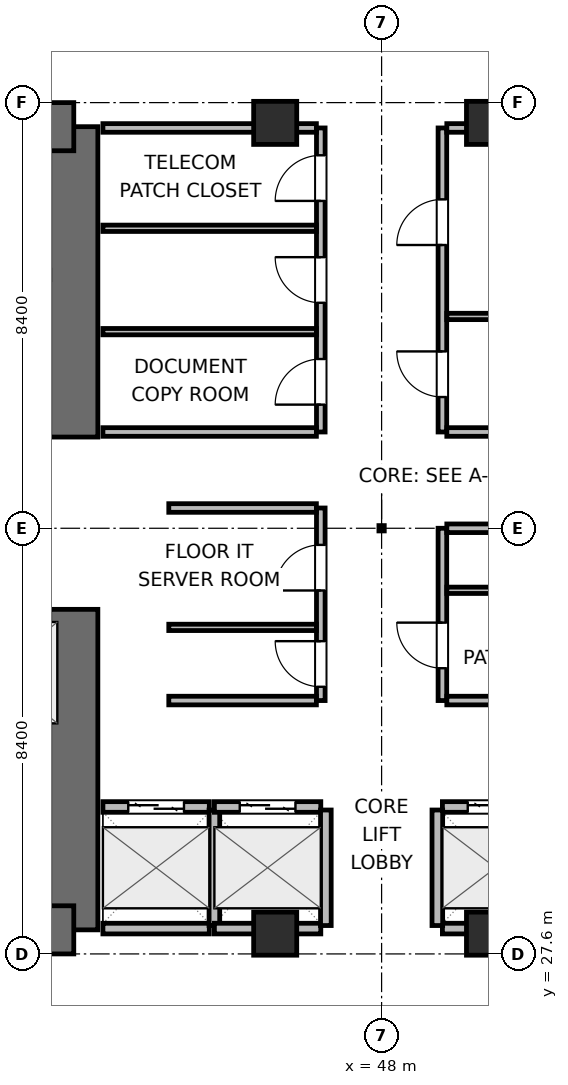
"""IFC4 building model, lengths in metres.
Left out: names, types, materials, properties, quantities, classifications, styles, units other than length and angle.
Written with IfcOpenShell. Run it as: python <this file> out.ifc"""

import sys

from ifc_helpers import new_model, si_unit, direction, frame, frame_2d, origin, origin_2d, place, context, subcontext, project, spatial, rectangle, extrude, element, fill, save


model = new_model("IFC4")
c1 = context("Model", 3, precision=1e-05, world=origin(), true_north=direction((0.0, 1.0)))
c2 = subcontext(c1, "Body", "Model", "MODEL_VIEW")
j1 = project(units=[si_unit("LENGTHUNIT", "METRE"), si_unit("PLANEANGLEUNIT", "RADIAN")], contexts=[c1])
p1 = place(None, origin())
s1 = spatial("IfcSite", under=j1, at=p1, CompositionType="ELEMENT")
p2 = place(p1, origin())
s2 = spatial("IfcBuilding", under=s1, at=p2, CompositionType="ELEMENT")
p3 = place(p2, frame((0.0, 0.0, 37.2)))
s3 = spatial("IfcBuildingStorey", under=s2, at=p3, CompositionType="ELEMENT", Elevation=37.2)
p4 = place(p3, frame((41.925, 28.075, 0.0), z_axis=(0.0, 0.0, 1.0), x_axis=(0.0, 1.0, 0.0)))
e1 = element("IfcWall", 1, at=p4, inside=s3, PredefinedType="SHEAR", context=c2, shape_type="SweptSolid", body=[
    extrude(rectangle(XDim=6.325, YDim=0.95, at=frame_2d((3.163, 0.0))), origin(), (0.0, 0.0, 1.0), 3.9),
])
p5 = place(p3, frame((41.925, 37.8, 0.0), z_axis=(0.0, 0.0, 1.0), x_axis=(0.0, 1.0, 0.0)))
e2 = element("IfcWall", 2, at=p5, inside=s3, PredefinedType="SHEAR", context=c2, shape_type="SweptSolid", body=[
    extrude(rectangle(XDim=6.125, YDim=0.95, at=frame_2d((3.062, 0.0))), origin(), (0.0, 0.0, 1.0), 3.9),
])
p6 = place(p3, frame((32.875, 28.075, 0.0), z_axis=(0.0, 0.0, 1.0), x_axis=(1.0, 0.0, 0.0)))
e3 = element("IfcWall", 3, at=p6, inside=s3, PredefinedType="SHEAR", context=c2, shape_type="SweptSolid", body=[
    extrude(rectangle(XDim=9.05, YDim=0.95, at=frame_2d((4.525, 0.0))), origin(), (0.0, 0.0, 1.0), 3.9),
])
p7 = place(p6, frame((4.975, 0.0, 0.0)))
e4 = element("IfcOpeningElement", 4, at=p7, cuts=e3, PredefinedType="OPENING", context=c2, shape_type="SweptSolid", body=[
    extrude(rectangle(XDim=1.05, YDim=2.04, at=frame_2d((0.525, 1.02))), frame((0.0, 0.485, 0.0), z_axis=(0.0, -1.0, 0.0), x_axis=(1.0, 0.0, 0.0)), (0.0, 0.0, 1.0), 0.97),
])
p8 = place(p3, frame((32.875, 43.925, 0.0), z_axis=(0.0, 0.0, 1.0), x_axis=(1.0, 0.0, 0.0)))
e5 = element("IfcWall", 5, at=p8, inside=s3, PredefinedType="SHEAR", context=c2, shape_type="SweptSolid", body=[
    extrude(rectangle(XDim=9.05, YDim=0.95, at=frame_2d((4.525, 0.0))), origin(), (0.0, 0.0, 1.0), 3.9),
])
p9 = place(p8, frame((0.975, 0.0, 0.0)))
e6 = element("IfcOpeningElement", 6, at=p9, cuts=e5, PredefinedType="OPENING", context=c2, shape_type="SweptSolid", body=[
    extrude(rectangle(XDim=0.95, YDim=2.04, at=frame_2d((0.475, 1.02))), frame((0.0, 0.485, 0.0), z_axis=(0.0, -1.0, 0.0), x_axis=(1.0, 0.0, 0.0)), (0.0, 0.0, 1.0), 0.97),
])
p10 = place(p8, frame((4.225, 0.0, 0.0)))
e7 = element("IfcOpeningElement", 7, at=p10, cuts=e5, PredefinedType="OPENING", context=c2, shape_type="SweptSolid", body=[
    extrude(rectangle(XDim=0.9, YDim=2.02, at=frame_2d((0.45, 1.01))), frame((0.0, 0.485, 0.0), z_axis=(0.0, -1.0, 0.0), x_axis=(1.0, 0.0, 0.0)), (0.0, 0.0, 1.0), 0.97),
])
p11 = place(p8, frame((7.125, 0.0, 0.0)))
e8 = element("IfcOpeningElement", 8, at=p11, cuts=e5, PredefinedType="OPENING", context=c2, shape_type="SweptSolid", body=[
    extrude(rectangle(XDim=0.9, YDim=2.02, at=frame_2d((0.45, 1.01))), frame((0.0, 0.485, 0.0), z_axis=(0.0, -1.0, 0.0), x_axis=(1.0, 0.0, 0.0)), (0.0, 0.0, 1.0), 0.97),
])
for number, where, z_axis, x_axis in (
    (9, (45.9, 28.0, 0.0), (0.0, 0.0, 1.0), (1.0, 0.0, 0.0)),
    (10, (50.1, 28.0, 0.0), (0.0, 0.0, 1.0), (1.0, 0.0, 0.0)),
    (11, (45.9, 44.0, 0.0), (0.0, 0.0, 1.0), (1.0, 0.0, 0.0)),
    (12, (50.1, 44.0, 0.0), (0.0, 0.0, 1.0), (1.0, 0.0, 0.0)),
):
    element("IfcColumn", number, at=place(p3, frame(where, z_axis=z_axis, x_axis=x_axis)), inside=s3, PredefinedType="COLUMN", context=c2, shape_type="SweptSolid", body=[
        extrude(rectangle(XDim=0.85, YDim=0.85, at=origin_2d()), origin(), (0.0, 0.0, 1.0), 3.9),
    ])
p12 = place(p3, frame((42.5, 30.5, 0.0), z_axis=(0.0, 0.0, 1.0), x_axis=(1.0, 0.0, 0.0)))
e13 = element("IfcWall", 13, at=p12, inside=s3, PredefinedType="PARTITIONING", context=c2, shape_type="SweptSolid", body=[
    extrude(rectangle(XDim=2.1, YDim=0.21, at=frame_2d((1.05, 0.0))), origin(), (0.0, 0.0, 1.0), 3.64),
])
p13 = place(p12, frame((0.5, 0.0, 0.0)))
e14 = element("IfcOpeningElement", 14, at=p13, cuts=e13, PredefinedType="OPENING", context=c2, shape_type="SweptSolid", body=[
    extrude(rectangle(XDim=1.1, YDim=2.04, at=frame_2d((0.55, 1.02))), frame((0.0, 0.115, 0.0), z_axis=(0.0, -1.0, 0.0), x_axis=(1.0, 0.0, 0.0)), (0.0, 0.0, 1.0), 0.23),
])
p14 = place(p3, frame((42.5, 28.1, 0.0), z_axis=(0.0, 0.0, 1.0), x_axis=(1.0, 0.0, 0.0)))
e15 = element("IfcWall", 15, at=p14, inside=s3, PredefinedType="PARTITIONING", context=c2, shape_type="SweptSolid", body=[
    extrude(rectangle(XDim=2.1, YDim=0.21, at=frame_2d((1.05, 0.0))), origin(), (0.0, 0.0, 1.0), 2.525),
])
p15 = place(p3, frame((44.7, 28.16, 0.0), z_axis=(0.0, 0.0, 1.0), x_axis=(0.0, 1.0, 0.0)))
e16 = element("IfcWall", 16, at=p15, inside=s3, PredefinedType="PARTITIONING", context=c2, shape_type="SweptSolid", body=[
    extrude(rectangle(XDim=2.28, YDim=0.21, at=frame_2d((1.14, 0.0))), origin(), (0.0, 0.0, 1.0), 3.64),
])
p16 = place(p3, frame((44.7, 30.5, 0.0), z_axis=(0.0, 0.0, 1.0), x_axis=(1.0, 0.0, 0.0)))
e17 = element("IfcWall", 17, at=p16, inside=s3, PredefinedType="PARTITIONING", context=c2, shape_type="SweptSolid", body=[
    extrude(rectangle(XDim=2.1, YDim=0.21, at=frame_2d((1.05, 0.0))), origin(), (0.0, 0.0, 1.0), 3.64),
])
p17 = place(p16, frame((0.5, 0.0, 0.0)))
e18 = element("IfcOpeningElement", 18, at=p17, cuts=e17, PredefinedType="OPENING", context=c2, shape_type="SweptSolid", body=[
    extrude(rectangle(XDim=1.1, YDim=2.04, at=frame_2d((0.55, 1.02))), frame((0.0, 0.115, 0.0), z_axis=(0.0, -1.0, 0.0), x_axis=(1.0, 0.0, 0.0)), (0.0, 0.0, 1.0), 0.23),
])
p18 = place(p3, frame((44.7, 28.1, 0.0), z_axis=(0.0, 0.0, 1.0), x_axis=(1.0, 0.0, 0.0)))
e19 = element("IfcWall", 19, at=p18, inside=s3, PredefinedType="PARTITIONING", context=c2, shape_type="SweptSolid", body=[
    extrude(rectangle(XDim=2.1, YDim=0.21, at=frame_2d((1.05, 0.0))), origin(), (0.0, 0.0, 1.0), 2.525),
])
p19 = place(p3, frame((46.9, 28.16, 0.0), z_axis=(0.0, 0.0, 1.0), x_axis=(0.0, 1.0, 0.0)))
e20 = element("IfcWall", 20, at=p19, inside=s3, PredefinedType="PARTITIONING", context=c2, shape_type="SweptSolid", body=[
    extrude(rectangle(XDim=2.28, YDim=0.21, at=frame_2d((1.14, 0.0))), origin(), (0.0, 0.0, 1.0), 3.64),
])
p20 = place(p3, frame((49.2, 30.5, 0.0), z_axis=(0.0, 0.0, 1.0), x_axis=(1.0, 0.0, 0.0)))
e21 = element("IfcWall", 21, at=p20, inside=s3, PredefinedType="PARTITIONING", context=c2, shape_type="SweptSolid", body=[
    extrude(rectangle(XDim=2.1, YDim=0.21, at=frame_2d((1.05, 0.0))), origin(), (0.0, 0.0, 1.0), 3.64),
])
p21 = place(p20, frame((0.5, 0.0, 0.0)))
e22 = element("IfcOpeningElement", 22, at=p21, cuts=e21, PredefinedType="OPENING", context=c2, shape_type="SweptSolid", body=[
    extrude(rectangle(XDim=1.1, YDim=2.04, at=frame_2d((0.55, 1.02))), frame((0.0, 0.115, 0.0), z_axis=(0.0, -1.0, 0.0), x_axis=(1.0, 0.0, 0.0)), (0.0, 0.0, 1.0), 0.23),
])
p22 = place(p3, frame((49.2, 28.1, 0.0), z_axis=(0.0, 0.0, 1.0), x_axis=(1.0, 0.0, 0.0)))
e23 = element("IfcWall", 23, at=p22, inside=s3, PredefinedType="PARTITIONING", context=c2, shape_type="SweptSolid", body=[
    extrude(rectangle(XDim=2.1, YDim=0.21, at=frame_2d((1.05, 0.0))), origin(), (0.0, 0.0, 1.0), 2.525),
])
p23 = place(p3, frame((49.1, 28.16, 0.0), z_axis=(0.0, 0.0, 1.0), x_axis=(0.0, 1.0, 0.0)))
e24 = element("IfcWall", 24, at=p23, inside=s3, PredefinedType="PARTITIONING", context=c2, shape_type="SweptSolid", body=[
    extrude(rectangle(XDim=2.28, YDim=0.21, at=frame_2d((1.14, 0.0))), origin(), (0.0, 0.0, 1.0), 3.64),
])
p24 = place(p3, frame((46.8, 32.6, 0.0), z_axis=(0.0, 0.0, 1.0), x_axis=(0.0, 1.0, 0.0)))
e25 = element("IfcWall", 25, at=p24, inside=s3, PredefinedType="PARTITIONING", context=c2, shape_type="SweptSolid", body=[
    extrude(rectangle(XDim=3.8, YDim=0.17, at=frame_2d((1.9, 0.0))), origin(), (0.0, 0.0, 1.0), 3.64),
])
p25 = place(p24, frame((0.272, 0.0, 0.0)))
e26 = element("IfcOpeningElement", 26, at=p25, cuts=e25, PredefinedType="OPENING", context=c2, shape_type="SweptSolid", body=[
    extrude(rectangle(XDim=0.9, YDim=2.02, at=frame_2d((0.45, 1.01))), frame((0.0, 0.095, 0.0), z_axis=(0.0, -1.0, 0.0), x_axis=(1.0, 0.0, 0.0)), (0.0, 0.0, 1.0), 0.19),
])
p26 = place(p24, frame((2.172, 0.0, 0.0)))
e27 = element("IfcOpeningElement", 27, at=p26, cuts=e25, PredefinedType="OPENING", context=c2, shape_type="SweptSolid", body=[
    extrude(rectangle(XDim=0.9, YDim=2.02, at=frame_2d((0.45, 1.01))), frame((0.0, 0.095, 0.0), z_axis=(0.0, -1.0, 0.0), x_axis=(1.0, 0.0, 0.0)), (0.0, 0.0, 1.0), 0.19),
])
for number, where, z_axis, x_axis in (
    (28, (43.8, 32.6, 0.0), (0.0, 0.0, 1.0), (1.0, 0.0, 0.0)),
    (29, (43.8, 36.4, 0.0), (0.0, 0.0, 1.0), (1.0, 0.0, 0.0)),
):
    element("IfcWall", number, at=place(p3, frame(where, z_axis=z_axis, x_axis=x_axis)), inside=s3, PredefinedType="PARTITIONING", context=c2, shape_type="SweptSolid", body=[
        extrude(rectangle(XDim=2.913, YDim=0.17, at=frame_2d((1.457, 0.0))), origin(), (0.0, 0.0, 1.0), 3.64),
    ])
p27 = place(p3, frame((43.8, 34.044, 0.0), z_axis=(0.0, 0.0, 1.0), x_axis=(1.0, 0.0, 0.0)))
e30 = element("IfcWall", 30, at=p27, inside=s3, PredefinedType="PARTITIONING", context=c2, shape_type="SweptSolid", body=[
    extrude(rectangle(XDim=2.913, YDim=0.125, at=frame_2d((1.457, 0.0))), origin(), (0.0, 0.0, 1.0), 3.64),
])
p28 = place(p3, frame((49.2, 32.6, 0.0), z_axis=(0.0, 0.0, 1.0), x_axis=(0.0, 1.0, 0.0)))
e31 = element("IfcWall", 31, at=p28, inside=s3, PredefinedType="PARTITIONING", context=c2, shape_type="SweptSolid", body=[
    extrude(rectangle(XDim=3.4, YDim=0.17, at=frame_2d((1.7, 0.0))), origin(), (0.0, 0.0, 1.0), 3.64),
])
p29 = place(p28, frame((0.638, 0.0, 0.0)))
e32 = element("IfcOpeningElement", 32, at=p29, cuts=e31, PredefinedType="OPENING", context=c2, shape_type="SweptSolid", body=[
    extrude(rectangle(XDim=0.9, YDim=2.02, at=frame_2d((0.45, 1.01))), frame((0.0, 0.095, 0.0), z_axis=(0.0, -1.0, 0.0), x_axis=(1.0, 0.0, 0.0)), (0.0, 0.0, 1.0), 0.19),
])
for number, where, z_axis, x_axis in (
    (33, (49.287, 32.6, 0.0), (0.0, 0.0, 1.0), (1.0, 0.0, 0.0)),
    (34, (49.287, 36.0, 0.0), (0.0, 0.0, 1.0), (1.0, 0.0, 0.0)),
):
    element("IfcWall", number, at=place(p3, frame(where, z_axis=z_axis, x_axis=x_axis)), inside=s3, PredefinedType="PARTITIONING", context=c2, shape_type="SweptSolid", body=[
        extrude(rectangle(XDim=2.913, YDim=0.17, at=frame_2d((1.457, 0.0))), origin(), (0.0, 0.0, 1.0), 3.64),
    ])
p30 = place(p3, frame((49.287, 34.776, 0.0), z_axis=(0.0, 0.0, 1.0), x_axis=(1.0, 0.0, 0.0)))
e35 = element("IfcWall", 35, at=p30, inside=s3, PredefinedType="PARTITIONING", context=c2, shape_type="SweptSolid", body=[
    extrude(rectangle(XDim=2.913, YDim=0.125, at=frame_2d((1.457, 0.0))), origin(), (0.0, 0.0, 1.0), 3.64),
])
p31 = place(p3, frame((46.8, 37.9, 0.0), z_axis=(0.0, 0.0, 1.0), x_axis=(0.0, 1.0, 0.0)))
e36 = element("IfcWall", 36, at=p31, inside=s3, PredefinedType="PARTITIONING", context=c2, shape_type="SweptSolid", body=[
    extrude(rectangle(XDim=6.0, YDim=0.17, at=frame_2d((3.0, 0.0))), origin(), (0.0, 0.0, 1.0), 3.64),
])
p32 = place(p31, frame((0.54, 0.0, 0.0)))
e37 = element("IfcOpeningElement", 37, at=p32, cuts=e36, PredefinedType="OPENING", context=c2, shape_type="SweptSolid", body=[
    extrude(rectangle(XDim=0.9, YDim=2.02, at=frame_2d((0.45, 1.01))), frame((0.0, 0.095, 0.0), z_axis=(0.0, -1.0, 0.0), x_axis=(1.0, 0.0, 0.0)), (0.0, 0.0, 1.0), 0.19),
])
p33 = place(p31, frame((2.55, 0.0, 0.0)))
e38 = element("IfcOpeningElement", 38, at=p33, cuts=e36, PredefinedType="OPENING", context=c2, shape_type="SweptSolid", body=[
    extrude(rectangle(XDim=0.9, YDim=2.02, at=frame_2d((0.45, 1.01))), frame((0.0, 0.095, 0.0), z_axis=(0.0, -1.0, 0.0), x_axis=(1.0, 0.0, 0.0)), (0.0, 0.0, 1.0), 0.19),
])
p34 = place(p31, frame((4.56, 0.0, 0.0)))
e39 = element("IfcOpeningElement", 39, at=p34, cuts=e36, PredefinedType="OPENING", context=c2, shape_type="SweptSolid", body=[
    extrude(rectangle(XDim=0.9, YDim=2.02, at=frame_2d((0.45, 1.01))), frame((0.0, 0.095, 0.0), z_axis=(0.0, -1.0, 0.0), x_axis=(1.0, 0.0, 0.0)), (0.0, 0.0, 1.0), 0.19),
])
p35 = place(p3, frame((42.5, 37.9, 0.0), z_axis=(0.0, 0.0, 1.0), x_axis=(1.0, 0.0, 0.0)))
e40 = element("IfcWall", 40, at=p35, inside=s3, PredefinedType="PARTITIONING", context=c2, shape_type="SweptSolid", body=[
    extrude(rectangle(XDim=4.213, YDim=0.17, at=frame_2d((2.106, 0.0))), origin(), (0.0, 0.0, 1.0), 3.64),
])
p36 = place(p3, frame((42.5, 43.9, 0.0), z_axis=(0.0, 0.0, 1.0), x_axis=(1.0, 0.0, 0.0)))
e41 = element("IfcWall", 41, at=p36, inside=s3, PredefinedType="PARTITIONING", context=c2, shape_type="SweptSolid", body=[
    extrude(rectangle(XDim=4.213, YDim=0.17, at=frame_2d((2.106, 0.0))), origin(), (0.0, 0.0, 1.0), 2.525),
])
for number, where, z_axis, x_axis in (
    (42, (42.5, 39.88, 0.0), (0.0, 0.0, 1.0), (1.0, 0.0, 0.0)),
    (43, (42.5, 41.92, 0.0), (0.0, 0.0, 1.0), (1.0, 0.0, 0.0)),
):
    element("IfcWall", number, at=place(p3, frame(where, z_axis=z_axis, x_axis=x_axis)), inside=s3, PredefinedType="PARTITIONING", context=c2, shape_type="SweptSolid", body=[
        extrude(rectangle(XDim=4.213, YDim=0.125, at=frame_2d((2.106, 0.0))), origin(), (0.0, 0.0, 1.0), 3.64),
    ])
p37 = place(p3, frame((49.2, 37.9, 0.0), z_axis=(0.0, 0.0, 1.0), x_axis=(0.0, 1.0, 0.0)))
e44 = element("IfcWall", 44, at=p37, inside=s3, PredefinedType="PARTITIONING", context=c2, shape_type="SweptSolid", body=[
    extrude(rectangle(XDim=6.0, YDim=0.17, at=frame_2d((3.0, 0.0))), origin(), (0.0, 0.0, 1.0), 3.64),
])
p38 = place(p37, frame((0.69, 0.0, 0.0)))
e45 = element("IfcOpeningElement", 45, at=p38, cuts=e44, PredefinedType="OPENING", context=c2, shape_type="SweptSolid", body=[
    extrude(rectangle(XDim=0.9, YDim=2.02, at=frame_2d((0.45, 1.01))), frame((0.0, 0.095, 0.0), z_axis=(0.0, -1.0, 0.0), x_axis=(1.0, 0.0, 0.0)), (0.0, 0.0, 1.0), 0.19),
])
p39 = place(p37, frame((3.69, 0.0, 0.0)))
e46 = element("IfcOpeningElement", 46, at=p39, cuts=e44, PredefinedType="OPENING", context=c2, shape_type="SweptSolid", body=[
    extrude(rectangle(XDim=0.9, YDim=2.02, at=frame_2d((0.45, 1.01))), frame((0.0, 0.095, 0.0), z_axis=(0.0, -1.0, 0.0), x_axis=(1.0, 0.0, 0.0)), (0.0, 0.0, 1.0), 0.19),
])
p40 = place(p3, frame((49.287, 37.9, 0.0), z_axis=(0.0, 0.0, 1.0), x_axis=(1.0, 0.0, 0.0)))
e47 = element("IfcWall", 47, at=p40, inside=s3, PredefinedType="PARTITIONING", context=c2, shape_type="SweptSolid", body=[
    extrude(rectangle(XDim=4.113, YDim=0.17, at=frame_2d((2.056, 0.0))), origin(), (0.0, 0.0, 1.0), 3.64),
])
p41 = place(p3, frame((49.287, 43.9, 0.0), z_axis=(0.0, 0.0, 1.0), x_axis=(1.0, 0.0, 0.0)))
e48 = element("IfcWall", 48, at=p41, inside=s3, PredefinedType="PARTITIONING", context=c2, shape_type="SweptSolid", body=[
    extrude(rectangle(XDim=4.113, YDim=0.17, at=frame_2d((2.056, 0.0))), origin(), (0.0, 0.0, 1.0), 2.525),
])
p42 = place(p3, frame((49.287, 40.18, 0.0), z_axis=(0.0, 0.0, 1.0), x_axis=(1.0, 0.0, 0.0)))
e49 = element("IfcWall", 49, at=p42, inside=s3, PredefinedType="PARTITIONING", context=c2, shape_type="SweptSolid", body=[
    extrude(rectangle(XDim=4.113, YDim=0.125, at=frame_2d((2.056, 0.0))), origin(), (0.0, 0.0, 1.0), 3.64),
])
p43 = place(p13, origin())
e50 = element("IfcDoor", 50, at=p43, inside=s3, OperationType="DOUBLE_DOOR_SLIDING", PredefinedType="DOOR", context=c2, shape_type="SweptSolid", body=[
    extrude(rectangle(XDim=1.1, YDim=2.04, at=frame_2d((0.55, 1.02))), frame((0.0, 0.025, 0.0), z_axis=(0.0, -1.0, 0.0), x_axis=(1.0, 0.0, 0.0)), (0.0, 0.0, 1.0), 0.05),
])
fill(e14, e50)
p44 = place(p17, origin())
e51 = element("IfcDoor", 51, at=p44, inside=s3, OperationType="DOUBLE_DOOR_SLIDING", PredefinedType="DOOR", context=c2, shape_type="SweptSolid", body=[
    extrude(rectangle(XDim=1.1, YDim=2.04, at=frame_2d((0.55, 1.02))), frame((0.0, 0.025, 0.0), z_axis=(0.0, -1.0, 0.0), x_axis=(1.0, 0.0, 0.0)), (0.0, 0.0, 1.0), 0.05),
])
fill(e18, e51)
p45 = place(p21, origin())
e52 = element("IfcDoor", 52, at=p45, inside=s3, OperationType="DOUBLE_DOOR_SLIDING", PredefinedType="DOOR", context=c2, shape_type="SweptSolid", body=[
    extrude(rectangle(XDim=1.1, YDim=2.04, at=frame_2d((0.55, 1.02))), frame((0.0, 0.025, 0.0), z_axis=(0.0, -1.0, 0.0), x_axis=(1.0, 0.0, 0.0)), (0.0, 0.0, 1.0), 0.05),
])
fill(e22, e52)
p46 = place(p25, origin())
e53 = element("IfcDoor", 53, at=p46, inside=s3, OperationType="SINGLE_SWING_RIGHT", PredefinedType="DOOR", context=c2, shape_type="SweptSolid", body=[
    extrude(rectangle(XDim=0.9, YDim=2.02, at=frame_2d((0.45, 1.01))), frame((0.0, 0.025, 0.0), z_axis=(0.0, -1.0, 0.0), x_axis=(1.0, 0.0, 0.0)), (0.0, 0.0, 1.0), 0.05),
])
fill(e26, e53)
p47 = place(p26, origin())
e54 = element("IfcDoor", 54, at=p47, inside=s3, OperationType="SINGLE_SWING_LEFT", PredefinedType="DOOR", context=c2, shape_type="SweptSolid", body=[
    extrude(rectangle(XDim=0.9, YDim=2.02, at=frame_2d((0.45, 1.01))), frame((0.0, 0.025, 0.0), z_axis=(0.0, -1.0, 0.0), x_axis=(1.0, 0.0, 0.0)), (0.0, 0.0, 1.0), 0.05),
])
fill(e27, e54)
p48 = place(p29, origin())
e55 = element("IfcDoor", 55, at=p48, inside=s3, OperationType="SINGLE_SWING_RIGHT", PredefinedType="DOOR", context=c2, shape_type="SweptSolid", body=[
    extrude(rectangle(XDim=0.9, YDim=2.02, at=frame_2d((0.45, 1.01))), frame((0.0, 0.025, 0.0), z_axis=(0.0, -1.0, 0.0), x_axis=(1.0, 0.0, 0.0)), (0.0, 0.0, 1.0), 0.05),
])
fill(e32, e55)
p49 = place(p32, origin())
e56 = element("IfcDoor", 56, at=p49, inside=s3, OperationType="SINGLE_SWING_LEFT", PredefinedType="DOOR", context=c2, shape_type="SweptSolid", body=[
    extrude(rectangle(XDim=0.9, YDim=2.02, at=frame_2d((0.45, 1.01))), frame((0.0, 0.025, 0.0), z_axis=(0.0, -1.0, 0.0), x_axis=(1.0, 0.0, 0.0)), (0.0, 0.0, 1.0), 0.05),
])
fill(e37, e56)
p50 = place(p33, origin())
e57 = element("IfcDoor", 57, at=p50, inside=s3, OperationType="SINGLE_SWING_RIGHT", PredefinedType="DOOR", context=c2, shape_type="SweptSolid", body=[
    extrude(rectangle(XDim=0.9, YDim=2.02, at=frame_2d((0.45, 1.01))), frame((0.0, 0.025, 0.0), z_axis=(0.0, -1.0, 0.0), x_axis=(1.0, 0.0, 0.0)), (0.0, 0.0, 1.0), 0.05),
])
fill(e38, e57)
p51 = place(p34, origin())
e58 = element("IfcDoor", 58, at=p51, inside=s3, OperationType="SINGLE_SWING_LEFT", PredefinedType="DOOR", context=c2, shape_type="SweptSolid", body=[
    extrude(rectangle(XDim=0.9, YDim=2.02, at=frame_2d((0.45, 1.01))), frame((0.0, 0.025, 0.0), z_axis=(0.0, -1.0, 0.0), x_axis=(1.0, 0.0, 0.0)), (0.0, 0.0, 1.0), 0.05),
])
fill(e39, e58)
p52 = place(p38, origin())
e59 = element("IfcDoor", 59, at=p52, inside=s3, OperationType="SINGLE_SWING_RIGHT", PredefinedType="DOOR", context=c2, shape_type="SweptSolid", body=[
    extrude(rectangle(XDim=0.9, YDim=2.02, at=frame_2d((0.45, 1.01))), frame((0.0, 0.025, 0.0), z_axis=(0.0, -1.0, 0.0), x_axis=(1.0, 0.0, 0.0)), (0.0, 0.0, 1.0), 0.05),
])
fill(e45, e59)
p53 = place(p39, origin())
e60 = element("IfcDoor", 60, at=p53, inside=s3, OperationType="SINGLE_SWING_LEFT", PredefinedType="DOOR", context=c2, shape_type="SweptSolid", body=[
    extrude(rectangle(XDim=0.9, YDim=2.02, at=frame_2d((0.45, 1.01))), frame((0.0, 0.025, 0.0), z_axis=(0.0, -1.0, 0.0), x_axis=(1.0, 0.0, 0.0)), (0.0, 0.0, 1.0), 0.05),
])
fill(e46, e60)
save(model, sys.argv[1])
